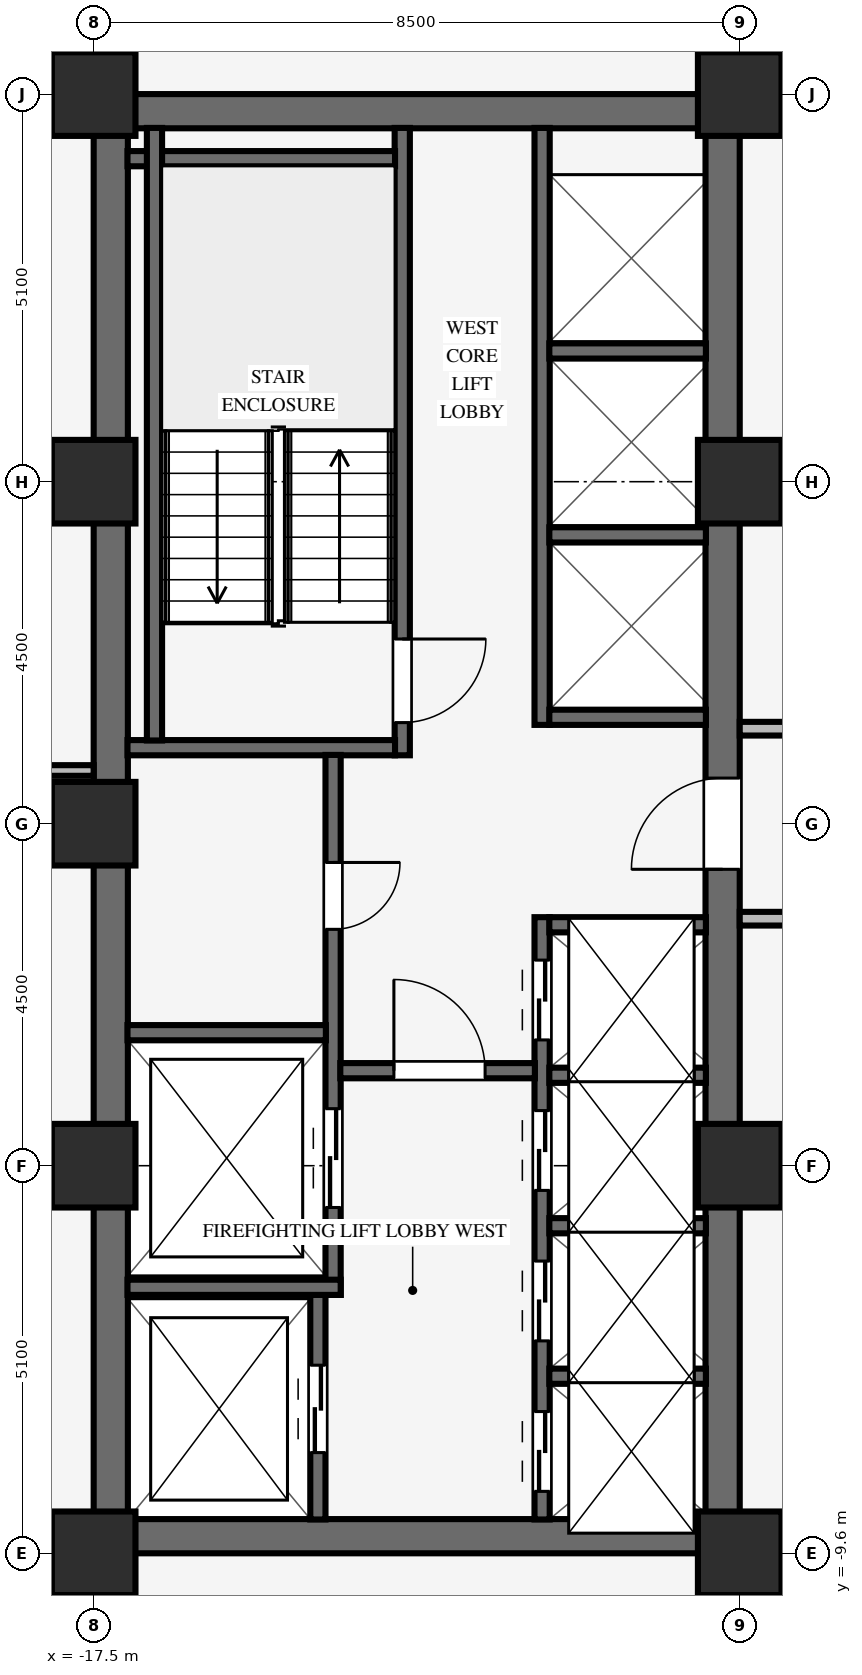
"""IFC4 building model, lengths in metres.
Left out: names, types, materials, properties, quantities, classifications, styles, units other than length and angle.
Written with IfcOpenShell. Run it as: python <this file> out.ifc"""

import sys

from ifc_helpers import new_model, si_unit, direction, frame, frame_2d, origin, origin_2d, place, context, subcontext, project, spatial, rectangle, extrude, source, transform, mapped, element, fill, save


model = new_model("IFC4")
c1 = context("Model", 3, precision=1e-05, world=origin(), true_north=direction((0.0, 1.0)))
c2 = subcontext(c1, "Body", "Model", "MODEL_VIEW")
j1 = project(units=[si_unit("LENGTHUNIT", "METRE"), si_unit("PLANEANGLEUNIT", "RADIAN")], contexts=[c1])
p1 = place(None, origin())
s1 = spatial("IfcSite", under=j1, at=p1, CompositionType="ELEMENT")
p2 = place(p1, origin())
s2 = spatial("IfcBuilding", under=s1, at=p2, CompositionType="ELEMENT")
p3 = place(p2, frame((0.0, 0.0, 82.35)))
s3 = spatial("IfcBuildingStorey", under=s2, at=p3, CompositionType="ELEMENT", Elevation=82.35)
for number, where, z_axis, x_axis in (
    (1, (-17.5, -9.375, 0.0), (0.0, 0.0, 1.0), (1.0, 0.0, 0.0)),
    (2, (-17.5, 9.375, 0.0), (0.0, 0.0, 1.0), (1.0, 0.0, 0.0)),
):
    element("IfcWall", number, at=place(p3, frame(where, z_axis=z_axis, x_axis=x_axis)), inside=s3, PredefinedType="SHEAR", context=c2, shape_type="SweptSolid", body=[
        extrude(rectangle(XDim=8.5, YDim=0.45, at=frame_2d((4.25, 0.0))), origin(), (0.0, 0.0, 1.0), 3.25),
    ])
p4 = place(p3, frame((-17.275, -9.155, 0.0), z_axis=(0.0, 0.0, 1.0), x_axis=(0.0, 1.0, 0.0)))
e3 = element("IfcWall", 3, at=p4, inside=s3, PredefinedType="SHEAR", context=c2, shape_type="SweptSolid", body=[
    extrude(rectangle(XDim=18.31, YDim=0.45, at=frame_2d((9.155, 0.0))), origin(), (0.0, 0.0, 1.0), 3.25),
])
p5 = place(p3, frame((-9.225, -9.155, 0.0), z_axis=(0.0, 0.0, 1.0), x_axis=(0.0, 1.0, 0.0)))
e4 = element("IfcWall", 4, at=p5, inside=s3, PredefinedType="SHEAR", context=c2, shape_type="SweptSolid", body=[
    extrude(rectangle(XDim=18.31, YDim=0.45, at=frame_2d((9.155, 0.0))), origin(), (0.0, 0.0, 1.0), 3.25),
])
p6 = place(p5, frame((8.555, 0.0, 0.0)))
e5 = element("IfcOpeningElement", 5, at=p6, cuts=e4, PredefinedType="OPENING", context=c2, shape_type="SweptSolid", body=[
    extrude(rectangle(XDim=1.2, YDim=2.15, at=frame_2d((0.6, 1.075))), frame((0.0, 0.235, 0.0), z_axis=(0.0, -1.0, 0.0), x_axis=(1.0, 0.0, 0.0)), (0.0, 0.0, 1.0), 0.47),
])
for number, where, z_axis, x_axis in (
    (6, (-17.5, -9.6, 0.0), (0.0, 0.0, 1.0), (1.0, 0.0, 0.0)),
    (7, (-17.5, -4.5, 0.0), (0.0, 0.0, 1.0), (1.0, 0.0, 0.0)),
    (8, (-17.5, 4.5, 0.0), (0.0, 0.0, 1.0), (1.0, 0.0, 0.0)),
    (9, (-17.5, 9.6, 0.0), (0.0, 0.0, 1.0), (1.0, 0.0, 0.0)),
    (10, (-9.0, -9.6, 0.0), (0.0, 0.0, 1.0), (1.0, 0.0, 0.0)),
    (11, (-9.0, -4.5, 0.0), (0.0, 0.0, 1.0), (1.0, 0.0, 0.0)),
    (12, (-9.0, 4.5, 0.0), (0.0, 0.0, 1.0), (1.0, 0.0, 0.0)),
    (13, (-9.0, 9.6, 0.0), (0.0, 0.0, 1.0), (1.0, 0.0, 0.0)),
    (14, (-17.5, 0.0, 0.0), (0.0, 0.0, 1.0), (1.0, 0.0, 0.0)),
):
    element("IfcColumn", number, at=place(p3, frame(where, z_axis=z_axis, x_axis=x_axis)), inside=s3, PredefinedType="COLUMN", context=c2, shape_type="SweptSolid", body=[
        extrude(rectangle(XDim=1.1, YDim=1.1, at=origin_2d()), origin(), (0.0, 0.0, 1.0), 3.25),
    ])
p7 = place(p3, frame((-13.44, 0.9, 0.0), z_axis=(0.0, 0.0, 1.0), x_axis=(0.0, 1.0, 0.0)))
e15 = element("IfcWall", 15, at=p7, inside=s3, PredefinedType="SHEAR", context=c2, shape_type="SweptSolid", body=[
    extrude(rectangle(XDim=8.255, YDim=0.2, at=frame_2d((4.127, 0.0))), origin(), (0.0, 0.0, 1.0), 3.25),
])
p8 = place(p7, frame((1.53, 0.0, 0.0), z_axis=(0.0, 0.0, 1.0), x_axis=(-1.0, 0.0, 0.0)))
e16 = element("IfcOpeningElement", 16, at=p8, cuts=e15, PredefinedType="OPENING", context=c2, shape_type="SweptSolid", body=[
    extrude(rectangle(XDim=1.1, YDim=2.15, at=frame_2d((0.55, 1.075))), frame((0.0, 0.11, 0.0), z_axis=(0.0, -1.0, 0.0), x_axis=(1.0, 0.0, 0.0)), (0.0, 0.0, 1.0), 0.22),
])
for number, where, z_axis, x_axis in (
    (17, (-17.055, 1.0, 0.0), (0.0, 0.0, 1.0), (1.0, 0.0, 0.0)),
    (18, (-17.055, 8.75, 0.0), (0.0, 0.0, 1.0), (1.0, 0.0, 0.0)),
):
    element("IfcWall", number, at=place(p3, frame(where, z_axis=z_axis, x_axis=x_axis)), inside=s3, PredefinedType="SHEAR", context=c2, shape_type="SweptSolid", body=[
        extrude(rectangle(XDim=3.52, YDim=0.2, at=frame_2d((1.76, 0.0))), origin(), (0.0, 0.0, 1.0), 3.25),
    ])
p9 = place(p3, frame((-16.7, 1.095, 0.0), z_axis=(0.0, 0.0, 1.0), x_axis=(0.0, 1.0, 0.0)))
e19 = element("IfcWall", 19, at=p9, inside=s3, PredefinedType="SHEAR", context=c2, shape_type="SweptSolid", body=[
    extrude(rectangle(XDim=8.06, YDim=0.2, at=frame_2d((4.03, 0.0))), origin(), (0.0, 0.0, 1.0), 3.25),
])
p10 = place(p3, frame((-14.55, -9.155, 0.0), z_axis=(0.0, 0.0, 1.0), x_axis=(0.0, 1.0, 0.0)))
e20 = element("IfcWall", 20, at=p10, inside=s3, PredefinedType="SHEAR", context=c2, shape_type="SweptSolid", body=[
    extrude(rectangle(XDim=2.96, YDim=0.2, at=frame_2d((1.48, 0.0))), origin(), (0.0, 0.0, 1.0), 3.25),
])
p11 = place(p10, frame((0.88, 0.0, 0.0)))
e21 = element("IfcOpeningElement", 21, at=p11, cuts=e20, PredefinedType="OPENING", context=c2, shape_type="SweptSolid", body=[
    extrude(rectangle(XDim=1.15, YDim=2.15, at=frame_2d((0.575, 1.075))), frame((0.0, 0.11, 0.0), z_axis=(0.0, -1.0, 0.0), x_axis=(1.0, 0.0, 0.0)), (0.0, 0.0, 1.0), 0.22),
])
p12 = place(p3, frame((-14.35, -6.2, 0.0), z_axis=(0.0, 0.0, 1.0), x_axis=(0.0, 1.0, 0.0)))
e22 = element("IfcWall", 22, at=p12, inside=s3, PredefinedType="SHEAR", context=c2, shape_type="SweptSolid", body=[
    extrude(rectangle(XDim=7.105, YDim=0.2, at=frame_2d((3.552, 0.0))), origin(), (0.0, 0.0, 1.0), 3.25),
])
p13 = place(p12, frame((5.69, 0.0, 0.0), z_axis=(0.0, 0.0, 1.0), x_axis=(-1.0, 0.0, 0.0)))
e23 = element("IfcOpeningElement", 23, at=p13, cuts=e22, PredefinedType="OPENING", context=c2, shape_type="SweptSolid", body=[
    extrude(rectangle(XDim=0.88, YDim=2.1, at=frame_2d((0.44, 1.05))), frame((0.0, 0.11, 0.0), z_axis=(0.0, -1.0, 0.0), x_axis=(1.0, 0.0, 0.0)), (0.0, 0.0, 1.0), 0.22),
])
p14 = place(p12, frame((1.15, 0.0, 0.0)))
e24 = element("IfcOpeningElement", 24, at=p14, cuts=e22, PredefinedType="OPENING", context=c2, shape_type="SweptSolid", body=[
    extrude(rectangle(XDim=1.3, YDim=2.2, at=frame_2d((0.65, 1.1))), frame((0.0, 0.11, 0.0), z_axis=(0.0, -1.0, 0.0), x_axis=(1.0, 0.0, 0.0)), (0.0, 0.0, 1.0), 0.22),
])
p15 = place(p3, frame((-17.055, -6.1, 0.0), z_axis=(0.0, 0.0, 1.0), x_axis=(1.0, 0.0, 0.0)))
e25 = element("IfcWall", 25, at=p15, inside=s3, PredefinedType="SHEAR", context=c2, shape_type="SweptSolid", body=[
    extrude(rectangle(XDim=2.805, YDim=0.2, at=frame_2d((1.402, 0.0))), origin(), (0.0, 0.0, 1.0), 3.25),
])
p16 = place(p3, frame((-17.055, -2.75, 0.0), z_axis=(0.0, 0.0, 1.0), x_axis=(1.0, 0.0, 0.0)))
e26 = element("IfcWall", 26, at=p16, inside=s3, PredefinedType="SHEAR", context=c2, shape_type="SweptSolid", body=[
    extrude(rectangle(XDim=2.61, YDim=0.2, at=frame_2d((1.305, 0.0))), origin(), (0.0, 0.0, 1.0), 3.25),
])
p17 = place(p3, frame((-11.6, -9.155, 0.0), z_axis=(0.0, 0.0, 1.0), x_axis=(0.0, 1.0, 0.0)))
e27 = element("IfcWall", 27, at=p17, inside=s3, PredefinedType="SHEAR", context=c2, shape_type="SweptSolid", body=[
    extrude(rectangle(XDim=7.925, YDim=0.2, at=frame_2d((3.962, 0.0))), origin(), (0.0, 0.0, 1.0), 3.25),
])
p18 = place(p17, frame((0.37, 0.0, 0.0)))
e28 = element("IfcOpeningElement", 28, at=p18, cuts=e27, PredefinedType="OPENING", context=c2, shape_type="SweptSolid", body=[
    extrude(rectangle(XDim=1.05, YDim=2.15, at=frame_2d((0.525, 1.075))), frame((0.0, 0.11, 0.0), z_axis=(0.0, -1.0, 0.0), x_axis=(1.0, 0.0, 0.0)), (0.0, 0.0, 1.0), 0.22),
])
p19 = place(p17, frame((2.35, 0.0, 0.0)))
e29 = element("IfcOpeningElement", 29, at=p19, cuts=e27, PredefinedType="OPENING", context=c2, shape_type="SweptSolid", body=[
    extrude(rectangle(XDim=1.05, YDim=2.15, at=frame_2d((0.525, 1.075))), frame((0.0, 0.11, 0.0), z_axis=(0.0, -1.0, 0.0), x_axis=(1.0, 0.0, 0.0)), (0.0, 0.0, 1.0), 0.22),
])
p20 = place(p17, frame((4.33, 0.0, 0.0)))
e30 = element("IfcOpeningElement", 30, at=p20, cuts=e27, PredefinedType="OPENING", context=c2, shape_type="SweptSolid", body=[
    extrude(rectangle(XDim=1.05, YDim=2.15, at=frame_2d((0.525, 1.075))), frame((0.0, 0.11, 0.0), z_axis=(0.0, -1.0, 0.0), x_axis=(1.0, 0.0, 0.0)), (0.0, 0.0, 1.0), 0.22),
])
p21 = place(p17, frame((6.31, 0.0, 0.0)))
e31 = element("IfcOpeningElement", 31, at=p21, cuts=e27, PredefinedType="OPENING", context=c2, shape_type="SweptSolid", body=[
    extrude(rectangle(XDim=1.05, YDim=2.15, at=frame_2d((0.525, 1.075))), frame((0.0, 0.11, 0.0), z_axis=(0.0, -1.0, 0.0), x_axis=(1.0, 0.0, 0.0)), (0.0, 0.0, 1.0), 0.22),
])
p22 = place(p3, frame((-14.255, -3.25, 0.0), z_axis=(0.0, 0.0, 1.0), x_axis=(1.0, 0.0, 0.0)))
e32 = element("IfcWall", 32, at=p22, inside=s3, PredefinedType="SHEAR", context=c2, shape_type="SweptSolid", body=[
    extrude(rectangle(XDim=2.56, YDim=0.2, at=frame_2d((1.28, 0.0))), origin(), (0.0, 0.0, 1.0), 3.25),
])
p23 = place(p22, frame((0.705, 0.0, 0.0)))
e33 = element("IfcOpeningElement", 33, at=p23, cuts=e32, PredefinedType="OPENING", context=c2, shape_type="SweptSolid", body=[
    extrude(rectangle(XDim=1.2, YDim=2.15, at=frame_2d((0.6, 1.075))), frame((0.0, 0.11, 0.0), z_axis=(0.0, -1.0, 0.0), x_axis=(1.0, 0.0, 0.0)), (0.0, 0.0, 1.0), 0.22),
])
for number, where, z_axis, x_axis in (
    (34, (-11.505, -7.27, 0.0), (0.0, 0.0, 1.0), (1.0, 0.0, 0.0)),
    (35, (-11.505, -5.29, 0.0), (0.0, 0.0, 1.0), (1.0, 0.0, 0.0)),
    (36, (-11.505, -3.31, 0.0), (0.0, 0.0, 1.0), (1.0, 0.0, 0.0)),
    (37, (-11.505, -1.33, 0.0), (0.0, 0.0, 1.0), (1.0, 0.0, 0.0)),
):
    element("IfcWall", number, at=place(p3, frame(where, z_axis=z_axis, x_axis=x_axis)), inside=s3, PredefinedType="SHEAR", context=c2, shape_type="SweptSolid", body=[
        extrude(rectangle(XDim=2.06, YDim=0.2, at=frame_2d((1.03, 0.0))), origin(), (0.0, 0.0, 1.0), 3.25),
    ])
p24 = place(p3, frame((-11.6, 1.3, 0.0), z_axis=(0.0, 0.0, 1.0), x_axis=(0.0, 1.0, 0.0)))
e38 = element("IfcWall", 38, at=p24, inside=s3, PredefinedType="SHEAR", context=c2, shape_type="SweptSolid", body=[
    extrude(rectangle(XDim=7.855, YDim=0.2, at=frame_2d((3.927, 0.0))), origin(), (0.0, 0.0, 1.0), 3.25),
])
for number, where, z_axis, x_axis in (
    (39, (-11.505, 1.4, 0.0), (0.0, 0.0, 1.0), (1.0, 0.0, 0.0)),
    (40, (-11.505, 3.8, 0.0), (0.0, 0.0, 1.0), (1.0, 0.0, 0.0)),
    (41, (-11.505, 6.22, 0.0), (0.0, 0.0, 1.0), (1.0, 0.0, 0.0)),
):
    element("IfcWall", number, at=place(p3, frame(where, z_axis=z_axis, x_axis=x_axis)), inside=s3, PredefinedType="SHEAR", context=c2, shape_type="SweptSolid", body=[
        extrude(rectangle(XDim=2.06, YDim=0.2, at=frame_2d((1.03, 0.0))), origin(), (0.0, 0.0, 1.0), 3.25),
    ])
p25 = place(p3, frame((-8.454, -9.6, 0.0), z_axis=(0.0, 0.0, 1.0), x_axis=(1.0, 0.0, 0.0)))
e42 = element("IfcWall", 42, at=p25, inside=s3, PredefinedType="PARTITIONING", context=c2, shape_type="SweptSolid", body=[
    extrude(rectangle(XDim=5.254, YDim=0.18, at=frame_2d((2.627, 0.0))), origin(), (0.0, 0.0, 1.0), 2.285),
])
p26 = place(p25, frame((2.147, 0.0, 0.0)))
e43 = element("IfcOpeningElement", 43, at=p26, cuts=e42, PredefinedType="OPENING", context=c2, shape_type="SweptSolid", body=[
    extrude(rectangle(XDim=0.96, YDim=2.1, at=frame_2d((0.48, 1.05))), frame((0.0, 0.1, 0.0), z_axis=(0.0, -1.0, 0.0), x_axis=(1.0, 0.0, 0.0)), (0.0, 0.0, 1.0), 0.2),
])
p27 = place(p3, frame((-8.454, -4.8, 0.0), z_axis=(0.0, 0.0, 1.0), x_axis=(1.0, 0.0, 0.0)))
e44 = element("IfcWall", 44, at=p27, inside=s3, PredefinedType="PARTITIONING", context=c2, shape_type="SweptSolid", body=[
    extrude(rectangle(XDim=5.168, YDim=0.14, at=frame_2d((2.584, 0.0))), origin(), (0.0, 0.0, 1.0), 2.618),
])
p28 = place(p3, frame((-9.0, -1.25, 0.0), z_axis=(0.0, 0.0, 1.0), x_axis=(1.0, 0.0, 0.0)))
e45 = element("IfcWall", 45, at=p28, inside=s3, PredefinedType="PARTITIONING", context=c2, shape_type="SweptSolid", body=[
    extrude(rectangle(XDim=5.8, YDim=0.18, at=frame_2d((2.9, 0.0))), origin(), (0.0, 0.0, 1.0), 3.24),
])
p29 = place(p28, frame((2.42, 0.0, 0.0)))
e46 = element("IfcOpeningElement", 46, at=p29, cuts=e45, PredefinedType="OPENING", context=c2, shape_type="SweptSolid", body=[
    extrude(rectangle(XDim=0.96, YDim=2.1, at=frame_2d((0.48, 1.05))), frame((0.0, 0.1, 0.0), z_axis=(0.0, -1.0, 0.0), x_axis=(1.0, 0.0, 0.0)), (0.0, 0.0, 1.0), 0.2),
])
p30 = place(p3, frame((-21.16, 0.7, 0.0), z_axis=(0.0, 0.0, 1.0), x_axis=(1.0, 0.0, 0.0)))
e47 = element("IfcWall", 47, at=p30, inside=s3, PredefinedType="PARTITIONING", context=c2, shape_type="SweptSolid", body=[
    extrude(rectangle(XDim=3.66, YDim=0.14, at=frame_2d((1.83, 0.0))), origin(), (0.0, 0.0, 1.0), 3.24),
])
p31 = place(p3, frame((-9.0, 1.25, 0.0), z_axis=(0.0, 0.0, 1.0), x_axis=(1.0, 0.0, 0.0)))
e48 = element("IfcWall", 48, at=p31, inside=s3, PredefinedType="PARTITIONING", context=c2, shape_type="SweptSolid", body=[
    extrude(rectangle(XDim=5.8, YDim=0.18, at=frame_2d((2.9, 0.0))), origin(), (0.0, 0.0, 1.0), 3.24),
])
p32 = place(p3, frame((-8.454, 9.6, 0.0), z_axis=(0.0, 0.0, 1.0), x_axis=(1.0, 0.0, 0.0)))
e49 = element("IfcWall", 49, at=p32, inside=s3, PredefinedType="PARTITIONING", context=c2, shape_type="SweptSolid", body=[
    extrude(rectangle(XDim=5.254, YDim=0.18, at=frame_2d((2.627, 0.0))), origin(), (0.0, 0.0, 1.0), 2.285),
])
for number, where, z_axis, x_axis in (
    (50, (-17.5, -11.114, 0.0), (0.0, 0.0, 1.0), (0.0, 1.0, 0.0)),
    (51, (-17.5, 10.146, 0.0), (0.0, 0.0, 1.0), (0.0, 1.0, 0.0)),
):
    element("IfcWall", number, at=place(p3, frame(where, z_axis=z_axis, x_axis=x_axis)), inside=s3, PredefinedType="PARTITIONING", context=c2, shape_type="SweptSolid", body=[
        extrude(rectangle(XDim=0.968, YDim=0.18, at=frame_2d((0.484, 0.0))), origin(), (0.0, 0.0, 1.0), 2.618),
    ])
m1 = source(origin(), c2, "Body", "SweptSolid", [
    extrude(rectangle(XDim=1.1, YDim=2.15, at=frame_2d((0.55, 1.075))), frame((0.0, 0.025, 0.0), z_axis=(0.0, -1.0, 0.0), x_axis=(1.0, 0.0, 0.0)), (0.0, 0.0, 1.0), 0.05),
])
p33 = place(p8, origin())
e52 = element("IfcDoor", 52, at=p33, inside=s3, OperationType="SINGLE_SWING_LEFT", PredefinedType="DOOR", context=c2, shape_type="MappedRepresentation", body=[
    mapped(m1, transform((0.0, 0.0, 0.0), scale=1.0)),
])
fill(e16, e52)
m2 = source(origin(), c2, "Body", "SweptSolid", [
    extrude(rectangle(XDim=0.88, YDim=2.1, at=frame_2d((0.44, 1.05))), frame((0.0, 0.025, 0.0), z_axis=(0.0, -1.0, 0.0), x_axis=(1.0, 0.0, 0.0)), (0.0, 0.0, 1.0), 0.05),
])
p34 = place(p13, origin())
e53 = element("IfcDoor", 53, at=p34, inside=s3, OperationType="SINGLE_SWING_LEFT", PredefinedType="DOOR", context=c2, shape_type="MappedRepresentation", body=[
    mapped(m2, transform((0.0, 0.0, 0.0), scale=1.0)),
])
fill(e23, e53)
m3 = source(origin(), c2, "Body", "SweptSolid", [
    extrude(rectangle(XDim=1.2, YDim=2.15, at=frame_2d((0.6, 1.075))), frame((0.0, 0.025, 0.0), z_axis=(0.0, -1.0, 0.0), x_axis=(1.0, 0.0, 0.0)), (0.0, 0.0, 1.0), 0.05),
])
p35 = place(p23, origin())
e54 = element("IfcDoor", 54, at=p35, inside=s3, OperationType="SINGLE_SWING_LEFT", PredefinedType="DOOR", context=c2, shape_type="MappedRepresentation", body=[
    mapped(m3, transform((0.0, 0.0, 0.0), scale=1.0)),
])
fill(e33, e54)
p36 = place(p6, origin())
e55 = element("IfcDoor", 55, at=p36, inside=s3, OperationType="SINGLE_SWING_LEFT", PredefinedType="DOOR", context=c2, shape_type="MappedRepresentation", body=[
    mapped(m3, transform((0.0, 0.0, 0.0), scale=1.0)),
])
fill(e5, e55)
m4 = source(origin(), c2, "Body", "SweptSolid", [
    extrude(rectangle(XDim=1.15, YDim=2.15, at=frame_2d((0.575, 1.075))), frame((0.0, 0.025, 0.0), z_axis=(0.0, -1.0, 0.0), x_axis=(1.0, 0.0, 0.0)), (0.0, 0.0, 1.0), 0.05),
])
p37 = place(p11, origin())
e56 = element("IfcDoor", 56, at=p37, inside=s3, OperationType="DOUBLE_DOOR_SLIDING", PredefinedType="DOOR", context=c2, shape_type="MappedRepresentation", body=[
    mapped(m4, transform((0.0, 0.0, 0.0), scale=1.0)),
])
fill(e21, e56)
m5 = source(origin(), c2, "Body", "SweptSolid", [
    extrude(rectangle(XDim=1.3, YDim=2.2, at=frame_2d((0.65, 1.1))), frame((0.0, 0.025, 0.0), z_axis=(0.0, -1.0, 0.0), x_axis=(1.0, 0.0, 0.0)), (0.0, 0.0, 1.0), 0.05),
])
p38 = place(p14, origin())
e57 = element("IfcDoor", 57, at=p38, inside=s3, OperationType="DOUBLE_DOOR_SLIDING", PredefinedType="DOOR", context=c2, shape_type="MappedRepresentation", body=[
    mapped(m5, transform((0.0, 0.0, 0.0), scale=1.0)),
])
fill(e24, e57)
m6 = source(origin(), c2, "Body", "SweptSolid", [
    extrude(rectangle(XDim=1.05, YDim=2.15, at=frame_2d((0.525, 1.075))), frame((0.0, 0.025, 0.0), z_axis=(0.0, -1.0, 0.0), x_axis=(1.0, 0.0, 0.0)), (0.0, 0.0, 1.0), 0.05),
])
p39 = place(p18, origin())
e58 = element("IfcDoor", 58, at=p39, inside=s3, OperationType="DOUBLE_DOOR_SLIDING", PredefinedType="DOOR", context=c2, shape_type="MappedRepresentation", body=[
    mapped(m6, transform((0.0, 0.0, 0.0), scale=1.0)),
])
fill(e28, e58)
p40 = place(p19, origin())
e59 = element("IfcDoor", 59, at=p40, inside=s3, OperationType="DOUBLE_DOOR_SLIDING", PredefinedType="DOOR", context=c2, shape_type="MappedRepresentation", body=[
    mapped(m6, transform((0.0, 0.0, 0.0), scale=1.0)),
])
fill(e29, e59)
p41 = place(p20, origin())
e60 = element("IfcDoor", 60, at=p41, inside=s3, OperationType="DOUBLE_DOOR_SLIDING", PredefinedType="DOOR", context=c2, shape_type="MappedRepresentation", body=[
    mapped(m6, transform((0.0, 0.0, 0.0), scale=1.0)),
])
fill(e30, e60)
p42 = place(p21, origin())
e61 = element("IfcDoor", 61, at=p42, inside=s3, OperationType="DOUBLE_DOOR_SLIDING", PredefinedType="DOOR", context=c2, shape_type="MappedRepresentation", body=[
    mapped(m6, transform((0.0, 0.0, 0.0), scale=1.0)),
])
fill(e31, e61)
save(model, sys.argv[1])
